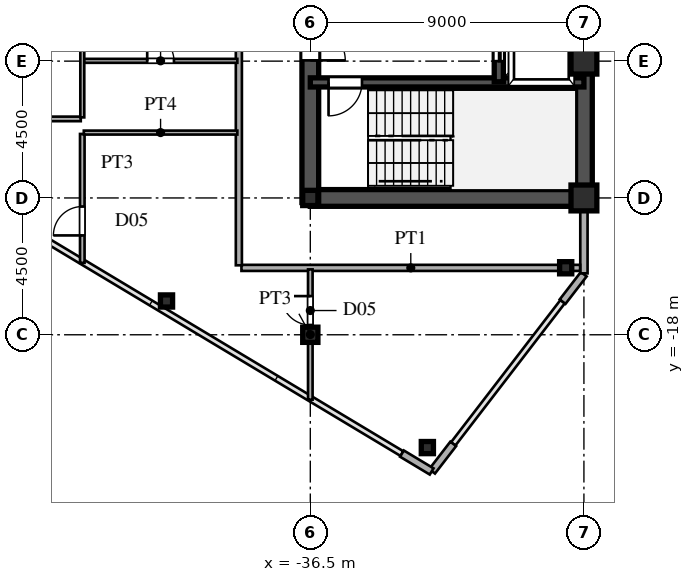
"""IFC4 building model, lengths in metres.
Left out: names, types, materials, properties, quantities, classifications, styles, units other than length and angle.
Written with IfcOpenShell. Run it as: python <this file> out.ifc"""

import sys

from ifc_helpers import new_model, si_unit, direction, frame, frame_2d, origin, origin_2d, place, context, subcontext, project, spatial, rectangle, hollow_rectangle, i_section, extrude, source, transform, mapped, element, fill, save


model = new_model("IFC4")
c1 = context("Model", 3, precision=1e-05, world=origin(), true_north=direction((0.0, 1.0)))
c2 = subcontext(c1, "Body", "Model", "MODEL_VIEW")
j1 = project(units=[si_unit("LENGTHUNIT", "METRE"), si_unit("PLANEANGLEUNIT", "RADIAN")], contexts=[c1])
p1 = place(None, origin())
s1 = spatial("IfcSite", under=j1, at=p1, CompositionType="ELEMENT")
p2 = place(p1, origin())
s2 = spatial("IfcBuilding", under=s1, at=p2, CompositionType="ELEMENT")
p3 = place(p2, frame((0.0, 0.0, 195.9)))
s3 = spatial("IfcBuildingStorey", under=s2, at=p3, CompositionType="ELEMENT", Elevation=195.9)
m1 = source(origin(), c2, "Body", "SweptSolid", [
    extrude(hollow_rectangle(XDim=0.85, YDim=0.85, WallThickness=0.036, at=origin_2d()), origin(), (0.0, 0.0, 1.0), 3.6),
])
for number, where, z_axis, x_axis in (
    (1, (-27.5, -13.5, 0.0), (0.0, 0.0, 1.0), (1.0, 0.0, 0.0)),
    (2, (-27.5, -9.0, 0.0), (0.0, 0.0, 1.0), (1.0, 0.0, 0.0)),
):
    element("IfcColumn", number, at=place(p3, frame(where, z_axis=z_axis, x_axis=x_axis)), inside=s3, PredefinedType="COLUMN", context=c2, shape_type="MappedRepresentation", body=[
        mapped(m1, transform((0.0, 0.0, 0.0), scale=1.0)),
    ])
m2 = source(origin(), c2, "Body", "SweptSolid", [
    extrude(i_section(OverallWidth=0.5, OverallDepth=0.5, WebThickness=0.02, FlangeThickness=0.032, at=origin_2d()), origin(), (0.0, 0.0, 1.0), 3.6),
])
for number, where, z_axis, x_axis in (
    (3, (-36.5, -18.0, 0.0), (0.0, 0.0, 1.0), (1.0, 0.0, 0.0)),
    (4, (-36.5, -13.5, 0.0), (0.0, 0.0, 1.0), (1.0, 0.0, 0.0)),
):
    element("IfcColumn", number, at=place(p3, frame(where, z_axis=z_axis, x_axis=x_axis)), inside=s3, PredefinedType="COLUMN", context=c2, shape_type="MappedRepresentation", body=[
        mapped(m2, transform((0.0, 0.0, 0.0), scale=1.0)),
    ])
m3 = source(origin(), c2, "Body", "SweptSolid", [
    extrude(hollow_rectangle(XDim=0.4, YDim=0.4, WallThickness=0.016, at=origin_2d()), origin(), (0.0, 0.0, 1.0), 3.6),
])
for number, where, z_axis, x_axis in (
    (5, (-28.1, -15.796, 0.0), (0.0, 0.0, 1.0), (1.0, 0.0, 0.0)),
    (6, (-32.65, -21.71, 0.0), (0.0, 0.0, 1.0), (1.0, 0.0, 0.0)),
    (7, (-41.23, -16.889, 0.0), (0.0, 0.0, 1.0), (1.0, 0.0, 0.0)),
):
    element("IfcColumn", number, at=place(p3, frame(where, z_axis=z_axis, x_axis=x_axis)), inside=s3, PredefinedType="COLUMN", context=c2, shape_type="MappedRepresentation", body=[
        mapped(m3, transform((0.0, 0.0, 0.0), scale=1.0)),
    ])
p4 = place(p3, frame((-27.5, -15.98, 0.0), z_axis=(0.0, 0.0, 1.0), x_axis=(0.0, 1.0, 0.0)))
e8 = element("IfcWall", 8, at=p4, inside=s3, PredefinedType="SOLIDWALL", context=c2, shape_type="SweptSolid", body=[
    extrude(rectangle(XDim=1.6, YDim=0.24, at=frame_2d((0.8, 0.0))), origin(), (0.0, 0.0, 1.0), 3.38),
])
p5 = place(p3, frame((-27.5, -14.38, 0.0), z_axis=(0.0, 0.0, 1.0), x_axis=(0.0, 1.0, 0.0)))
e9 = element("IfcWall", 9, at=p5, inside=s3, PredefinedType="SOLIDWALL", context=c2, shape_type="SweptSolid", body=[
    extrude(rectangle(XDim=0.6, YDim=0.24, at=frame_2d((0.3, 0.0))), origin(), (0.0, 0.0, 1.0), 2.88),
])
for number, where, z_axis, x_axis in (
    (10, (-33.486, -21.908, 0.0), (0.0, 0.0, 1.0), (0.857, -0.515, 0.0)),
    (11, (-32.494, -22.492, 0.0), (0.0, 0.0, 1.0), (0.61, 0.793, 0.0)),
    (12, (-28.201, -16.912, 0.0), (0.0, 0.0, 1.0), (0.61, 0.793, 0.0)),
):
    element("IfcWall", number, at=place(p3, frame(where, z_axis=z_axis, x_axis=x_axis)), inside=s3, PredefinedType="SOLIDWALL", context=c2, shape_type="SweptSolid", body=[
        extrude(rectangle(XDim=1.14, YDim=0.24, at=frame_2d((0.57, 0.0))), origin(), (0.0, 0.0, 1.0), 3.38),
    ])
p6 = place(p3, frame((-27.5, -13.5, 0.0), z_axis=(0.0, 0.0, 1.0), x_axis=(0.0, 1.0, 0.0)))
e13 = element("IfcWall", 13, at=p6, inside=s3, PredefinedType="SHEAR", context=c2, shape_type="SweptSolid", body=[
    extrude(rectangle(XDim=12.2, YDim=0.55, at=frame_2d((6.1, 0.0))), origin(), (0.0, 0.0, 1.0), 3.38),
])
p7 = place(p3, frame((-36.5, -13.5, 0.0), z_axis=(0.0, 0.0, 1.0), x_axis=(1.0, 0.0, 0.0)))
e14 = element("IfcWall", 14, at=p7, inside=s3, PredefinedType="SHEAR", context=c2, shape_type="SweptSolid", body=[
    extrude(rectangle(XDim=9.0, YDim=0.55, at=frame_2d((4.5, 0.0))), origin(), (0.0, 0.0, 1.0), 3.38),
])
p8 = place(p3, frame((-36.5, -13.65, 0.0), z_axis=(0.0, 0.0, 1.0), x_axis=(0.0, 1.0, 0.0)))
e15 = element("IfcWall", 15, at=p8, inside=s3, PredefinedType="SHEAR", context=c2, shape_type="SweptSolid", body=[
    extrude(rectangle(XDim=7.15, YDim=0.55, at=frame_2d((3.575, 0.0))), origin(), (0.0, 0.0, 1.0), 3.38),
])
p9 = place(p8, frame((4.675, 0.0, 0.0)))
e16 = element("IfcOpeningElement", 16, at=p9, cuts=e15, PredefinedType="OPENING", context=c2, shape_type="SweptSolid", body=[
    extrude(rectangle(XDim=1.15, YDim=2.2, at=frame_2d((0.575, 1.1))), frame((0.0, 0.285, 0.0), z_axis=(0.0, -1.0, 0.0), x_axis=(1.0, 0.0, 0.0)), (0.0, 0.0, 1.0), 0.57),
])
p10 = place(p3, frame((-36.5, -9.7, 0.0), z_axis=(0.0, 0.0, 1.0), x_axis=(1.0, 0.0, 0.0)))
e17 = element("IfcWall", 17, at=p10, inside=s3, PredefinedType="SHEAR", context=c2, shape_type="SweptSolid", body=[
    extrude(rectangle(XDim=9.0, YDim=0.3, at=frame_2d((4.5, 0.0))), origin(), (0.0, 0.0, 1.0), 3.38),
])
p11 = place(p10, frame((0.6, 0.0, 0.0)))
e18 = element("IfcOpeningElement", 18, at=p11, cuts=e17, PredefinedType="OPENING", context=c2, shape_type="SweptSolid", body=[
    extrude(rectangle(XDim=1.1, YDim=2.2, at=frame_2d((0.55, 1.1))), frame((0.0, 0.16, 0.0), z_axis=(0.0, -1.0, 0.0), x_axis=(1.0, 0.0, 0.0)), (0.0, 0.0, 1.0), 0.32),
])
p12 = place(p3, frame((-30.3, -9.68, 0.0), z_axis=(0.0, 0.0, 1.0), x_axis=(0.0, 1.0, 0.0)))
e19 = element("IfcWall", 19, at=p12, inside=s3, PredefinedType="SHEAR", context=c2, shape_type="SweptSolid", body=[
    extrude(rectangle(XDim=2.56, YDim=0.3, at=frame_2d((1.28, 0.0))), origin(), (0.0, 0.0, 1.0), 3.38),
])
p13 = place(p12, frame((0.68, 0.0, 0.0)))
e20 = element("IfcOpeningElement", 20, at=p13, cuts=e19, PredefinedType="OPENING", context=c2, shape_type="SweptSolid", body=[
    extrude(rectangle(XDim=1.2, YDim=2.25, at=frame_2d((0.6, 1.125))), frame((0.0, 0.16, 0.0), z_axis=(0.0, -1.0, 0.0), x_axis=(1.0, 0.0, 0.0)), (0.0, 0.0, 1.0), 0.32),
])
p14 = place(p3, frame((-38.765, -15.8, 0.0), z_axis=(0.0, 0.0, 1.0), x_axis=(1.0, 0.0, 0.0)))
e21 = element("IfcWall", 21, at=p14, inside=s3, PredefinedType="PARTITIONING", context=c2, shape_type="SweptSolid", body=[
    extrude(rectangle(XDim=11.14, YDim=0.2, at=frame_2d((5.57, 0.0))), origin(), (0.0, 0.0, 1.0), 3.38),
])
p15 = place(p3, frame((-43.95, -11.35, 0.0), z_axis=(0.0, 0.0, 1.0), x_axis=(1.0, 0.0, 0.0)))
e22 = element("IfcWall", 22, at=p15, inside=s3, PredefinedType="PARTITIONING", context=c2, shape_type="SweptSolid", body=[
    extrude(rectangle(XDim=5.05, YDim=0.13, at=frame_2d((2.525, 0.0))), origin(), (0.0, 0.0, 1.0), 3.38),
])
p16 = place(p3, frame((-51.868, -10.9, 0.0), z_axis=(0.0, 0.0, 1.0), x_axis=(1.0, 0.0, 0.0)))
e23 = element("IfcWall", 23, at=p16, inside=s3, PredefinedType="PARTITIONING", context=c2, shape_type="SweptSolid", body=[
    extrude(rectangle(XDim=7.818, YDim=0.15, at=frame_2d((3.909, 0.0))), origin(), (0.0, 0.0, 1.0), 3.38),
])
p17 = place(p16, frame((3.476, 0.0, 0.0)))
e24 = element("IfcOpeningElement", 24, at=p17, cuts=e23, PredefinedType="OPENING", context=c2, shape_type="SweptSolid", body=[
    extrude(rectangle(XDim=0.95, YDim=2.15, at=frame_2d((0.475, 1.075))), frame((0.0, 0.085, 0.0), z_axis=(0.0, -1.0, 0.0), x_axis=(1.0, 0.0, 0.0)), (0.0, 0.0, 1.0), 0.17),
])
p18 = place(p3, frame((-43.95, -8.99, 0.0), z_axis=(0.0, 0.0, 1.0), x_axis=(1.0, 0.0, 0.0)))
e25 = element("IfcWall", 25, at=p18, inside=s3, PredefinedType="PARTITIONING", context=c2, shape_type="SweptSolid", body=[
    extrude(rectangle(XDim=5.05, YDim=0.13, at=frame_2d((2.525, 0.0))), origin(), (0.0, 0.0, 1.0), 3.38),
])
p19 = place(p18, frame((2.085, 0.0, 0.0)))
e26 = element("IfcOpeningElement", 26, at=p19, cuts=e25, PredefinedType="OPENING", context=c2, shape_type="SweptSolid", body=[
    extrude(rectangle(XDim=0.88, YDim=2.1, at=frame_2d((0.44, 1.05))), frame((0.0, 0.075, 0.0), z_axis=(0.0, -1.0, 0.0), x_axis=(1.0, 0.0, 0.0)), (0.0, 0.0, 1.0), 0.15),
])
p20 = place(p3, frame((-44.0, -15.635, 0.0), z_axis=(0.0, 0.0, 1.0), x_axis=(0.0, 1.0, 0.0)))
e27 = element("IfcWall", 27, at=p20, inside=s3, PredefinedType="PARTITIONING", context=c2, shape_type="SweptSolid", body=[
    extrude(rectangle(XDim=4.24, YDim=0.15, at=frame_2d((2.12, 0.0))), origin(), (0.0, 0.0, 1.0), 3.38),
])
p21 = place(p20, frame((0.903, 0.0, 0.0)))
e28 = element("IfcOpeningElement", 28, at=p21, cuts=e27, PredefinedType="OPENING", context=c2, shape_type="SweptSolid", body=[
    extrude(rectangle(XDim=0.95, YDim=2.15, at=frame_2d((0.475, 1.075))), frame((0.0, 0.085, 0.0), z_axis=(0.0, -1.0, 0.0), x_axis=(1.0, 0.0, 0.0)), (0.0, 0.0, 1.0), 0.17),
])
p22 = place(p3, frame((-44.0, -10.85, 0.0), z_axis=(0.0, 0.0, 1.0), x_axis=(0.0, 1.0, 0.0)))
e29 = element("IfcWall", 29, at=p22, inside=s3, PredefinedType="PARTITIONING", context=c2, shape_type="SweptSolid", body=[
    extrude(rectangle(XDim=13.533, YDim=0.13, at=frame_2d((6.767, 0.0))), origin(), (0.0, 0.0, 1.0), 3.38),
])
p23 = place(p22, frame((2.778, 0.0, 0.0)))
e30 = element("IfcOpeningElement", 30, at=p23, cuts=e29, PredefinedType="OPENING", context=c2, shape_type="SweptSolid", body=[
    extrude(rectangle(XDim=0.95, YDim=2.15, at=frame_2d((0.475, 1.075))), frame((0.0, 0.075, 0.0), z_axis=(0.0, -1.0, 0.0), x_axis=(1.0, 0.0, 0.0)), (0.0, 0.0, 1.0), 0.15),
])
p24 = place(p22, frame((10.875, 0.0, 0.0)))
e31 = element("IfcOpeningElement", 31, at=p24, cuts=e29, PredefinedType="OPENING", context=c2, shape_type="SweptSolid", body=[
    extrude(rectangle(XDim=0.95, YDim=2.15, at=frame_2d((0.475, 1.075))), frame((0.0, 0.075, 0.0), z_axis=(0.0, -1.0, 0.0), x_axis=(1.0, 0.0, 0.0)), (0.0, 0.0, 1.0), 0.15),
])
p25 = place(p3, frame((-38.85, -15.715, 0.0), z_axis=(0.0, 0.0, 1.0), x_axis=(0.0, 1.0, 0.0)))
e32 = element("IfcWall", 32, at=p25, inside=s3, PredefinedType="PARTITIONING", context=c2, shape_type="SweptSolid", body=[
    extrude(rectangle(XDim=31.43, YDim=0.2, at=frame_2d((15.715, 0.0))), origin(), (0.0, 0.0, 1.0), 3.38),
])
p26 = place(p25, frame((7.593, 0.0, 0.0)))
e33 = element("IfcOpeningElement", 33, at=p26, cuts=e32, PredefinedType="OPENING", context=c2, shape_type="SweptSolid", body=[
    extrude(rectangle(XDim=1.05, YDim=2.25, at=frame_2d((0.525, 1.125))), frame((0.0, 0.11, 0.0), z_axis=(0.0, -1.0, 0.0), x_axis=(1.0, 0.0, 0.0)), (0.0, 0.0, 1.0), 0.22),
])
p27 = place(p25, frame((15.489, 0.0, 0.0)))
e34 = element("IfcOpeningElement", 34, at=p27, cuts=e32, PredefinedType="OPENING", context=c2, shape_type="SweptSolid", body=[
    extrude(rectangle(XDim=1.05, YDim=2.25, at=frame_2d((0.525, 1.125))), frame((0.0, 0.11, 0.0), z_axis=(0.0, -1.0, 0.0), x_axis=(1.0, 0.0, 0.0)), (0.0, 0.0, 1.0), 0.22),
])
p28 = place(p25, frame((26.69, 0.0, 0.0)))
e35 = element("IfcOpeningElement", 35, at=p28, cuts=e32, PredefinedType="OPENING", context=c2, shape_type="SweptSolid", body=[
    extrude(rectangle(XDim=1.05, YDim=2.25, at=frame_2d((0.525, 1.125))), frame((0.0, 0.11, 0.0), z_axis=(0.0, -1.0, 0.0), x_axis=(1.0, 0.0, 0.0)), (0.0, 0.0, 1.0), 0.22),
])
p29 = place(p3, frame((-36.5, -20.135, 0.0), z_axis=(0.0, 0.0, 1.0), x_axis=(0.0, 1.0, 0.0)))
e36 = element("IfcWall", 36, at=p29, inside=s3, PredefinedType="PARTITIONING", context=c2, shape_type="SweptSolid", body=[
    extrude(rectangle(XDim=4.285, YDim=0.15, at=frame_2d((2.143, 0.0))), origin(), (0.0, 0.0, 1.0), 2.78),
])
p30 = place(p29, frame((2.457, 0.0, 0.0)))
e37 = element("IfcOpeningElement", 37, at=p30, cuts=e36, PredefinedType="OPENING", context=c2, shape_type="SweptSolid", body=[
    extrude(rectangle(XDim=0.95, YDim=2.15, at=frame_2d((0.475, 1.075))), frame((0.0, 0.085, 0.0), z_axis=(0.0, -1.0, 0.0), x_axis=(1.0, 0.0, 0.0)), (0.0, 0.0, 1.0), 0.17),
])
m4 = source(origin(), c2, "Body", "SweptSolid", [
    extrude(rectangle(XDim=1.15, YDim=2.2, at=frame_2d((0.575, 1.1))), frame((0.0, 0.025, 0.0), z_axis=(0.0, -1.0, 0.0), x_axis=(1.0, 0.0, 0.0)), (0.0, 0.0, 1.0), 0.05),
])
p31 = place(p9, frame((1.15, 0.0, 0.0), z_axis=(0.0, 0.0, 1.0), x_axis=(-1.0, 0.0, 0.0)))
e38 = element("IfcDoor", 38, at=p31, inside=s3, OperationType="SINGLE_SWING_LEFT", PredefinedType="DOOR", context=c2, shape_type="MappedRepresentation", body=[
    mapped(m4, transform((0.0, 0.0, 0.0), scale=1.0)),
])
fill(e16, e38)
m5 = source(origin(), c2, "Body", "SweptSolid", [
    extrude(rectangle(XDim=1.1, YDim=2.2, at=frame_2d((0.55, 1.1))), frame((0.0, 0.025, 0.0), z_axis=(0.0, -1.0, 0.0), x_axis=(1.0, 0.0, 0.0)), (0.0, 0.0, 1.0), 0.05),
])
p32 = place(p11, frame((1.1, 0.0, 0.0), z_axis=(0.0, 0.0, 1.0), x_axis=(-1.0, 0.0, 0.0)))
e39 = element("IfcDoor", 39, at=p32, inside=s3, OperationType="SINGLE_SWING_LEFT", PredefinedType="DOOR", context=c2, shape_type="MappedRepresentation", body=[
    mapped(m5, transform((0.0, 0.0, 0.0), scale=1.0)),
])
fill(e18, e39)
m6 = source(origin(), c2, "Body", "SweptSolid", [
    extrude(rectangle(XDim=1.2, YDim=2.25, at=frame_2d((0.6, 1.125))), frame((0.0, 0.025, 0.0), z_axis=(0.0, -1.0, 0.0), x_axis=(1.0, 0.0, 0.0)), (0.0, 0.0, 1.0), 0.05),
])
p33 = place(p13, origin())
e40 = element("IfcDoor", 40, at=p33, inside=s3, OperationType="DOUBLE_DOOR_SLIDING", PredefinedType="DOOR", context=c2, shape_type="MappedRepresentation", body=[
    mapped(m6, transform((0.0, 0.0, 0.0), scale=1.0)),
])
fill(e20, e40)
m7 = source(origin(), c2, "Body", "SweptSolid", [
    extrude(rectangle(XDim=0.88, YDim=2.1, at=frame_2d((0.44, 1.05))), frame((0.0, 0.025, 0.0), z_axis=(0.0, -1.0, 0.0), x_axis=(1.0, 0.0, 0.0)), (0.0, 0.0, 1.0), 0.05),
])
p34 = place(p19, origin())
e41 = element("IfcDoor", 41, at=p34, inside=s3, OperationType="SINGLE_SWING_LEFT", PredefinedType="DOOR", context=c2, shape_type="MappedRepresentation", body=[
    mapped(m7, transform((0.0, 0.0, 0.0), scale=1.0)),
])
fill(e26, e41)
m8 = source(origin(), c2, "Body", "SweptSolid", [
    extrude(rectangle(XDim=0.95, YDim=2.15, at=frame_2d((0.475, 1.075))), frame((0.0, 0.025, 0.0), z_axis=(0.0, -1.0, 0.0), x_axis=(1.0, 0.0, 0.0)), (0.0, 0.0, 1.0), 0.05),
])
p35 = place(p21, origin())
e42 = element("IfcDoor", 42, at=p35, inside=s3, OperationType="SINGLE_SWING_LEFT", PredefinedType="DOOR", context=c2, shape_type="MappedRepresentation", body=[
    mapped(m8, transform((0.0, 0.0, 0.0), scale=1.0)),
])
fill(e28, e42)
p36 = place(p30, origin())
e43 = element("IfcDoor", 43, at=p36, inside=s3, OperationType="SINGLE_SWING_RIGHT", PredefinedType="DOOR", context=c2, shape_type="MappedRepresentation", body=[
    mapped(m8, transform((0.0, 0.0, 0.0), scale=1.0)),
])
fill(e37, e43)
save(model, sys.argv[1])
